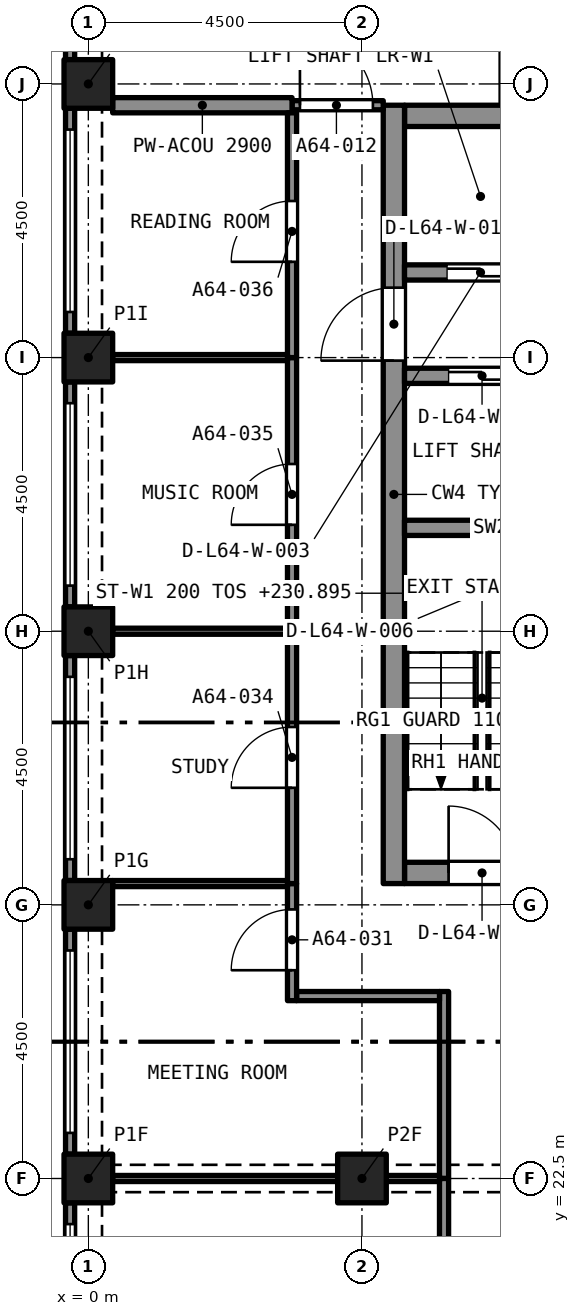
"""IFC4 building model, lengths in metres.
Left out: names, types, materials, properties, quantities, classifications, styles, units other than length and angle.
Written with IfcOpenShell. Run it as: python <this file> out.ifc"""

import sys

from ifc_helpers import new_model, si_unit, direction, frame, frame_2d, origin, origin_2d, place, context, subcontext, project, spatial, rectangle, extrude, element, fill, save


model = new_model("IFC4")
c1 = context("Model", 3, precision=1e-05, world=origin(), true_north=direction((0.0, 1.0)))
c2 = subcontext(c1, "Body", "Model", "MODEL_VIEW")
j1 = project(units=[si_unit("LENGTHUNIT", "METRE"), si_unit("PLANEANGLEUNIT", "RADIAN")], contexts=[c1])
p1 = place(None, origin())
s1 = spatial("IfcSite", under=j1, at=p1, CompositionType="ELEMENT")
p2 = place(p1, origin())
s2 = spatial("IfcBuilding", under=s1, at=p2, CompositionType="ELEMENT")
p3 = place(p2, frame((0.0, 0.0, 229.295)))
s3 = spatial("IfcBuildingStorey", under=s2, at=p3, CompositionType="ELEMENT", Elevation=229.295)
for number, where, z_axis, x_axis in (
    (1, (0.0, 22.5, 0.0), (0.0, 0.0, 1.0), (1.0, 0.0, 0.0)),
    (2, (4.5, 22.5, 0.0), (0.0, 0.0, 1.0), (1.0, 0.0, 0.0)),
    (3, (0.0, 27.0, 0.0), (0.0, 0.0, 1.0), (1.0, 0.0, 0.0)),
    (4, (0.0, 31.5, 0.0), (0.0, 0.0, 1.0), (1.0, 0.0, 0.0)),
    (5, (0.0, 36.0, 0.0), (0.0, 0.0, 1.0), (1.0, 0.0, 0.0)),
    (6, (0.0, 40.5, 0.0), (0.0, 0.0, 1.0), (1.0, 0.0, 0.0)),
):
    element("IfcColumn", number, at=place(p3, frame(where, z_axis=z_axis, x_axis=x_axis)), inside=s3, PredefinedType="COLUMN", context=c2, shape_type="SweptSolid", body=[
        extrude(rectangle(XDim=0.8, YDim=0.8, at=origin_2d()), origin(), (0.0, 0.0, 1.0), 3.2),
    ])
p4 = place(p3, frame((5.2, 27.525, 0.0), z_axis=(0.0, 0.0, 1.0), x_axis=(1.0, 0.0, 0.0)))
e7 = element("IfcWall", 7, at=p4, inside=s3, PredefinedType="SOLIDWALL", context=c2, shape_type="SweptSolid", body=[
    extrude(rectangle(XDim=7.6, YDim=0.35, at=frame_2d((3.8, 0.0))), origin(), (0.0, 0.0, 1.0), 3.2),
])
p5 = place(p4, frame((0.725, 0.0, 0.0)))
e8 = element("IfcOpeningElement", 8, at=p5, cuts=e7, PredefinedType="OPENING", context=c2, shape_type="SweptSolid", body=[
    extrude(rectangle(XDim=1.1, YDim=2.1, at=frame_2d((0.55, 1.05))), frame((0.0, 0.185, 0.0), z_axis=(0.0, -1.0, 0.0), x_axis=(1.0, 0.0, 0.0)), (0.0, 0.0, 1.0), 0.37),
])
p6 = place(p4, frame((3.25, 0.0, 0.0)))
e9 = element("IfcOpeningElement", 9, at=p6, cuts=e7, PredefinedType="OPENING", context=c2, shape_type="SweptSolid", body=[
    extrude(rectangle(XDim=1.1, YDim=2.1, at=frame_2d((0.55, 1.05))), frame((0.0, 0.185, 0.0), z_axis=(0.0, -1.0, 0.0), x_axis=(1.0, 0.0, 0.0)), (0.0, 0.0, 1.0), 0.37),
])
p7 = place(p4, frame((5.775, 0.0, 0.0)))
e10 = element("IfcOpeningElement", 10, at=p7, cuts=e7, PredefinedType="OPENING", context=c2, shape_type="SweptSolid", body=[
    extrude(rectangle(XDim=1.1, YDim=2.1, at=frame_2d((0.55, 1.05))), frame((0.0, 0.185, 0.0), z_axis=(0.0, -1.0, 0.0), x_axis=(1.0, 0.0, 0.0)), (0.0, 0.0, 1.0), 0.37),
])
p8 = place(p3, frame((5.2, 39.975, 0.0), z_axis=(0.0, 0.0, 1.0), x_axis=(1.0, 0.0, 0.0)))
e11 = element("IfcWall", 11, at=p8, inside=s3, PredefinedType="SOLIDWALL", context=c2, shape_type="SweptSolid", body=[
    extrude(rectangle(XDim=7.6, YDim=0.35, at=frame_2d((3.8, 0.0))), origin(), (0.0, 0.0, 1.0), 3.2),
])
p9 = place(p3, frame((5.025, 27.35, 0.0), z_axis=(0.0, 0.0, 1.0), x_axis=(0.0, 1.0, 0.0)))
e12 = element("IfcWall", 12, at=p9, inside=s3, PredefinedType="SOLIDWALL", context=c2, shape_type="SweptSolid", body=[
    extrude(rectangle(XDim=12.8, YDim=0.35, at=frame_2d((6.4, 0.0))), origin(), (0.0, 0.0, 1.0), 3.2),
])
p10 = place(p9, frame((8.6, 0.0, 0.0)))
e13 = element("IfcOpeningElement", 13, at=p10, cuts=e12, PredefinedType="OPENING", context=c2, shape_type="SweptSolid", body=[
    extrude(rectangle(XDim=1.2, YDim=2.1, at=frame_2d((0.6, 1.05))), frame((0.0, 0.185, 0.0), z_axis=(0.0, -1.0, 0.0), x_axis=(1.0, 0.0, 0.0)), (0.0, 0.0, 1.0), 0.37),
])
p11 = place(p3, frame((-0.3, 40.9, 0.0), z_axis=(0.0, 0.0, 1.0), x_axis=(0.0, 1.0, 0.0)))
e14 = element("IfcWall", 14, at=p11, inside=s3, PredefinedType="SOLIDWALL", context=c2, shape_type="SweptSolid", body=[
    extrude(rectangle(XDim=3.7, YDim=0.15, at=frame_2d((1.85, 0.0))), origin(), (0.0, 0.0, 1.0), 3.2),
])
p12 = place(p11, frame((0.35, 0.0, 0.45)))
e15 = element("IfcOpeningElement", 15, at=p12, cuts=e14, PredefinedType="OPENING", context=c2, shape_type="SweptSolid", body=[
    extrude(rectangle(XDim=3.0, YDim=1.95, at=frame_2d((1.5, 0.975))), frame((0.0, 0.085, 0.0), z_axis=(0.0, -1.0, 0.0), x_axis=(1.0, 0.0, 0.0)), (0.0, 0.0, 1.0), 0.17),
])
p13 = place(p3, frame((-0.3, 36.4, 0.0), z_axis=(0.0, 0.0, 1.0), x_axis=(0.0, 1.0, 0.0)))
e16 = element("IfcWall", 16, at=p13, inside=s3, PredefinedType="SOLIDWALL", context=c2, shape_type="SweptSolid", body=[
    extrude(rectangle(XDim=3.7, YDim=0.15, at=frame_2d((1.85, 0.0))), origin(), (0.0, 0.0, 1.0), 3.2),
])
p14 = place(p13, frame((0.35, 0.0, 0.45)))
e17 = element("IfcOpeningElement", 17, at=p14, cuts=e16, PredefinedType="OPENING", context=c2, shape_type="SweptSolid", body=[
    extrude(rectangle(XDim=3.0, YDim=1.95, at=frame_2d((1.5, 0.975))), frame((0.0, 0.085, 0.0), z_axis=(0.0, -1.0, 0.0), x_axis=(1.0, 0.0, 0.0)), (0.0, 0.0, 1.0), 0.17),
])
p15 = place(p3, frame((-0.3, 31.9, 0.0), z_axis=(0.0, 0.0, 1.0), x_axis=(0.0, 1.0, 0.0)))
e18 = element("IfcWall", 18, at=p15, inside=s3, PredefinedType="SOLIDWALL", context=c2, shape_type="SweptSolid", body=[
    extrude(rectangle(XDim=3.7, YDim=0.15, at=frame_2d((1.85, 0.0))), origin(), (0.0, 0.0, 1.0), 3.2),
])
p16 = place(p15, frame((0.35, 0.0, 0.45)))
e19 = element("IfcOpeningElement", 19, at=p16, cuts=e18, PredefinedType="OPENING", context=c2, shape_type="SweptSolid", body=[
    extrude(rectangle(XDim=3.0, YDim=1.95, at=frame_2d((1.5, 0.975))), frame((0.0, 0.085, 0.0), z_axis=(0.0, -1.0, 0.0), x_axis=(1.0, 0.0, 0.0)), (0.0, 0.0, 1.0), 0.17),
])
p17 = place(p3, frame((-0.3, 27.4, 0.0), z_axis=(0.0, 0.0, 1.0), x_axis=(0.0, 1.0, 0.0)))
e20 = element("IfcWall", 20, at=p17, inside=s3, PredefinedType="SOLIDWALL", context=c2, shape_type="SweptSolid", body=[
    extrude(rectangle(XDim=3.7, YDim=0.15, at=frame_2d((1.85, 0.0))), origin(), (0.0, 0.0, 1.0), 3.2),
])
p18 = place(p17, frame((0.35, 0.0, 0.45)))
e21 = element("IfcOpeningElement", 21, at=p18, cuts=e20, PredefinedType="OPENING", context=c2, shape_type="SweptSolid", body=[
    extrude(rectangle(XDim=3.0, YDim=1.95, at=frame_2d((1.5, 0.975))), frame((0.0, 0.085, 0.0), z_axis=(0.0, -1.0, 0.0), x_axis=(1.0, 0.0, 0.0)), (0.0, 0.0, 1.0), 0.17),
])
p19 = place(p3, frame((-0.3, 22.9, 0.0), z_axis=(0.0, 0.0, 1.0), x_axis=(0.0, 1.0, 0.0)))
e22 = element("IfcWall", 22, at=p19, inside=s3, PredefinedType="SOLIDWALL", context=c2, shape_type="SweptSolid", body=[
    extrude(rectangle(XDim=3.7, YDim=0.15, at=frame_2d((1.85, 0.0))), origin(), (0.0, 0.0, 1.0), 3.2),
])
p20 = place(p19, frame((0.35, 0.0, 0.45)))
e23 = element("IfcOpeningElement", 23, at=p20, cuts=e22, PredefinedType="OPENING", context=c2, shape_type="SweptSolid", body=[
    extrude(rectangle(XDim=3.0, YDim=1.95, at=frame_2d((1.5, 0.975))), frame((0.0, 0.085, 0.0), z_axis=(0.0, -1.0, 0.0), x_axis=(1.0, 0.0, 0.0)), (0.0, 0.0, 1.0), 0.17),
])
p21 = place(p3, frame((-0.3, 18.4, 0.0), z_axis=(0.0, 0.0, 1.0), x_axis=(0.0, 1.0, 0.0)))
e24 = element("IfcWall", 24, at=p21, inside=s3, PredefinedType="SOLIDWALL", context=c2, shape_type="SweptSolid", body=[
    extrude(rectangle(XDim=3.7, YDim=0.15, at=frame_2d((1.85, 0.0))), origin(), (0.0, 0.0, 1.0), 3.2),
])
p22 = place(p21, frame((0.35, 0.0, 0.45)))
e25 = element("IfcOpeningElement", 25, at=p22, cuts=e24, PredefinedType="OPENING", context=c2, shape_type="SweptSolid", body=[
    extrude(rectangle(XDim=3.0, YDim=1.95, at=frame_2d((1.5, 0.975))), frame((0.0, 0.085, 0.0), z_axis=(0.0, -1.0, 0.0), x_axis=(1.0, 0.0, 0.0)), (0.0, 0.0, 1.0), 0.17),
])
p23 = place(p3, frame((3.35, 40.15, 0.0), z_axis=(0.0, 0.0, 1.0), x_axis=(1.0, 0.0, 0.0)))
e26 = element("IfcWall", 26, at=p23, inside=s3, PredefinedType="PARTITIONING", context=c2, shape_type="SweptSolid", body=[
    extrude(rectangle(XDim=1.5, YDim=0.15, at=frame_2d((0.75, 0.0))), origin(), (0.0, 0.0, 1.0), 2.9),
])
p24 = place(p23, frame((0.13, 0.0, 0.0)))
e27 = element("IfcOpeningElement", 27, at=p24, cuts=e26, PredefinedType="OPENING", context=c2, shape_type="SweptSolid", body=[
    extrude(rectangle(XDim=1.2, YDim=2.4, at=frame_2d((0.6, 1.2))), frame((0.0, 0.085, 0.0), z_axis=(0.0, -1.0, 0.0), x_axis=(1.0, 0.0, 0.0)), (0.0, 0.0, 1.0), 0.17),
])
p25 = place(p3, frame((0.4, 40.15, 0.0), z_axis=(0.0, 0.0, 1.0), x_axis=(1.0, 0.0, 0.0)))
e28 = element("IfcWall", 28, at=p25, inside=s3, PredefinedType="PARTITIONING", context=c2, shape_type="SweptSolid", body=[
    extrude(rectangle(XDim=2.95, YDim=0.25, at=frame_2d((1.475, 0.0))), origin(), (0.0, 0.0, 1.0), 2.9),
])
p26 = place(p3, frame((5.85, 22.5, 0.0), z_axis=(0.0, 0.0, 1.0), x_axis=(0.0, 1.0, 0.0)))
e29 = element("IfcWall", 29, at=p26, inside=s3, PredefinedType="PARTITIONING", context=c2, shape_type="SweptSolid", body=[
    extrude(rectangle(XDim=3.075, YDim=0.15, at=frame_2d((1.538, 0.0))), origin(), (0.0, 0.0, 1.0), 2.9),
])
p27 = place(p3, frame((3.425, 25.5, 0.0), z_axis=(0.0, 0.0, 1.0), x_axis=(1.0, 0.0, 0.0)))
e30 = element("IfcWall", 30, at=p27, inside=s3, PredefinedType="PARTITIONING", context=c2, shape_type="SweptSolid", body=[
    extrude(rectangle(XDim=2.35, YDim=0.15, at=frame_2d((1.175, 0.0))), origin(), (0.0, 0.0, 1.0), 2.9),
])
p28 = place(p3, frame((3.35, 25.425, 0.0), z_axis=(0.0, 0.0, 1.0), x_axis=(0.0, 1.0, 0.0)))
e31 = element("IfcWall", 31, at=p28, inside=s3, PredefinedType="PARTITIONING", context=c2, shape_type="SweptSolid", body=[
    extrude(rectangle(XDim=1.925, YDim=0.15, at=frame_2d((0.962, 0.0))), origin(), (0.0, 0.0, 1.0), 2.9),
])
p29 = place(p28, frame((0.5, 0.0, 0.0)))
e32 = element("IfcOpeningElement", 32, at=p29, cuts=e31, PredefinedType="OPENING", context=c2, shape_type="SweptSolid", body=[
    extrude(rectangle(XDim=1.0, YDim=2.1, at=frame_2d((0.5, 1.05))), frame((0.0, 0.085, 0.0), z_axis=(0.0, -1.0, 0.0), x_axis=(1.0, 0.0, 0.0)), (0.0, 0.0, 1.0), 0.17),
])
p30 = place(p3, frame((3.35, 27.35, 0.0), z_axis=(0.0, 0.0, 1.0), x_axis=(0.0, 1.0, 0.0)))
e33 = element("IfcWall", 33, at=p30, inside=s3, PredefinedType="PARTITIONING", context=c2, shape_type="SweptSolid", body=[
    extrude(rectangle(XDim=4.15, YDim=0.15, at=frame_2d((2.075, 0.0))), origin(), (0.0, 0.0, 1.0), 2.9),
])
p31 = place(p30, frame((1.575, 0.0, 0.0)))
e34 = element("IfcOpeningElement", 34, at=p31, cuts=e33, PredefinedType="OPENING", context=c2, shape_type="SweptSolid", body=[
    extrude(rectangle(XDim=1.0, YDim=2.1, at=frame_2d((0.5, 1.05))), frame((0.0, 0.085, 0.0), z_axis=(0.0, -1.0, 0.0), x_axis=(1.0, 0.0, 0.0)), (0.0, 0.0, 1.0), 0.17),
])
p32 = place(p3, frame((3.35, 31.5, 0.0), z_axis=(0.0, 0.0, 1.0), x_axis=(0.0, 1.0, 0.0)))
e35 = element("IfcWall", 35, at=p32, inside=s3, PredefinedType="PARTITIONING", context=c2, shape_type="SweptSolid", body=[
    extrude(rectangle(XDim=4.5, YDim=0.15, at=frame_2d((2.25, 0.0))), origin(), (0.0, 0.0, 1.0), 2.9),
])
p33 = place(p32, frame((1.75, 0.0, 0.0)))
e36 = element("IfcOpeningElement", 36, at=p33, cuts=e35, PredefinedType="OPENING", context=c2, shape_type="SweptSolid", body=[
    extrude(rectangle(XDim=1.0, YDim=2.1, at=frame_2d((0.5, 1.05))), frame((0.0, 0.085, 0.0), z_axis=(0.0, -1.0, 0.0), x_axis=(1.0, 0.0, 0.0)), (0.0, 0.0, 1.0), 0.17),
])
p34 = place(p3, frame((3.35, 36.0, 0.0), z_axis=(0.0, 0.0, 1.0), x_axis=(0.0, 1.0, 0.0)))
e37 = element("IfcWall", 37, at=p34, inside=s3, PredefinedType="PARTITIONING", context=c2, shape_type="SweptSolid", body=[
    extrude(rectangle(XDim=4.025, YDim=0.15, at=frame_2d((2.012, 0.0))), origin(), (0.0, 0.0, 1.0), 2.9),
])
p35 = place(p34, frame((1.575, 0.0, 0.0)))
e38 = element("IfcOpeningElement", 38, at=p35, cuts=e37, PredefinedType="OPENING", context=c2, shape_type="SweptSolid", body=[
    extrude(rectangle(XDim=1.0, YDim=2.1, at=frame_2d((0.5, 1.05))), frame((0.0, 0.085, 0.0), z_axis=(0.0, -1.0, 0.0), x_axis=(1.0, 0.0, 0.0)), (0.0, 0.0, 1.0), 0.17),
])
p36 = place(p3, frame((5.85, 13.025, 0.0), z_axis=(0.0, 0.0, 1.0), x_axis=(0.0, 1.0, 0.0)))
e39 = element("IfcWall", 39, at=p36, inside=s3, PredefinedType="PARTITIONING", context=c2, shape_type="SweptSolid", body=[
    extrude(rectangle(XDim=9.475, YDim=0.15, at=frame_2d((4.738, 0.0))), origin(), (0.0, 0.0, 1.0), 2.9),
])
p37 = place(p36, frame((4.275, 0.0, 0.0)))
e40 = element("IfcOpeningElement", 40, at=p37, cuts=e39, PredefinedType="OPENING", context=c2, shape_type="SweptSolid", body=[
    extrude(rectangle(XDim=1.0, YDim=2.1, at=frame_2d((0.5, 1.05))), frame((0.0, 0.085, 0.0), z_axis=(0.0, -1.0, 0.0), x_axis=(1.0, 0.0, 0.0)), (0.0, 0.0, 1.0), 0.17),
])
p38 = place(p3, frame((0.4, 27.35, 0.0), z_axis=(0.0, 0.0, 1.0), x_axis=(1.0, 0.0, 0.0)))
e41 = element("IfcWall", 41, at=p38, inside=s3, PredefinedType="PARTITIONING", context=c2, shape_type="SweptSolid", body=[
    extrude(rectangle(XDim=2.875, YDim=0.1, at=frame_2d((1.438, 0.0))), origin(), (0.0, 0.0, 1.0), 2.9),
])
p39 = place(p3, frame((4.9, 22.5, 0.0), z_axis=(0.0, 0.0, 1.0), x_axis=(1.0, 0.0, 0.0)))
e42 = element("IfcWall", 42, at=p39, inside=s3, PredefinedType="PARTITIONING", context=c2, shape_type="SweptSolid", body=[
    extrude(rectangle(XDim=0.875, YDim=0.1, at=frame_2d((0.438, 0.0))), origin(), (0.0, 0.0, 1.0), 2.38),
])
p40 = place(p3, frame((0.4, 22.5, 0.0), z_axis=(0.0, 0.0, 1.0), x_axis=(1.0, 0.0, 0.0)))
e43 = element("IfcWall", 43, at=p40, inside=s3, PredefinedType="PARTITIONING", context=c2, shape_type="SweptSolid", body=[
    extrude(rectangle(XDim=3.7, YDim=0.1, at=frame_2d((1.85, 0.0))), origin(), (0.0, 0.0, 1.0), 2.38),
])
for number, where, z_axis, x_axis in (
    (44, (0.4, 31.5, 0.0), (0.0, 0.0, 1.0), (1.0, 0.0, 0.0)),
    (45, (0.4, 36.0, 0.0), (0.0, 0.0, 1.0), (1.0, 0.0, 0.0)),
):
    element("IfcWall", number, at=place(p3, frame(where, z_axis=z_axis, x_axis=x_axis)), inside=s3, PredefinedType="PARTITIONING", context=c2, shape_type="SweptSolid", body=[
        extrude(rectangle(XDim=2.875, YDim=0.1, at=frame_2d((1.438, 0.0))), origin(), (0.0, 0.0, 1.0), 2.9),
    ])
p41 = place(p3, frame((5.2, 33.2, 0.0), z_axis=(0.0, 0.0, 1.0), x_axis=(1.0, 0.0, 0.0)))
e46 = element("IfcWall", 46, at=p41, inside=s3, PredefinedType="SOLIDWALL", context=c2, shape_type="SweptSolid", body=[
    extrude(rectangle(XDim=7.6, YDim=0.25, at=frame_2d((3.8, 0.0))), origin(), (0.0, 0.0, 1.0), 2.9),
])
p42 = place(p41, frame((3.3, 0.0, 0.0)))
e47 = element("IfcOpeningElement", 47, at=p42, cuts=e46, PredefinedType="OPENING", context=c2, shape_type="SweptSolid", body=[
    extrude(rectangle(XDim=1.0, YDim=2.1, at=frame_2d((0.5, 1.05))), frame((0.0, 0.135, 0.0), z_axis=(0.0, -1.0, 0.0), x_axis=(1.0, 0.0, 0.0)), (0.0, 0.0, 1.0), 0.27),
])
p43 = place(p3, frame((5.2, 35.7, 0.0), z_axis=(0.0, 0.0, 1.0), x_axis=(1.0, 0.0, 0.0)))
e48 = element("IfcWall", 48, at=p43, inside=s3, PredefinedType="SOLIDWALL", context=c2, shape_type="SweptSolid", body=[
    extrude(rectangle(XDim=7.6, YDim=0.25, at=frame_2d((3.8, 0.0))), origin(), (0.0, 0.0, 1.0), 2.9),
])
p44 = place(p43, frame((0.725, 0.0, 0.0)))
e49 = element("IfcOpeningElement", 49, at=p44, cuts=e48, PredefinedType="OPENING", context=c2, shape_type="SweptSolid", body=[
    extrude(rectangle(XDim=1.1, YDim=2.4, at=frame_2d((0.55, 1.2))), frame((0.0, 0.135, 0.0), z_axis=(0.0, -1.0, 0.0), x_axis=(1.0, 0.0, 0.0)), (0.0, 0.0, 1.0), 0.27),
])
p45 = place(p43, frame((5.875, 0.0, 0.0)))
e50 = element("IfcOpeningElement", 50, at=p45, cuts=e48, PredefinedType="OPENING", context=c2, shape_type="SweptSolid", body=[
    extrude(rectangle(XDim=0.9, YDim=2.1, at=frame_2d((0.45, 1.05))), frame((0.0, 0.135, 0.0), z_axis=(0.0, -1.0, 0.0), x_axis=(1.0, 0.0, 0.0)), (0.0, 0.0, 1.0), 0.27),
])
p46 = place(p3, frame((5.2, 37.4, 0.0), z_axis=(0.0, 0.0, 1.0), x_axis=(1.0, 0.0, 0.0)))
e51 = element("IfcWall", 51, at=p46, inside=s3, PredefinedType="SOLIDWALL", context=c2, shape_type="SweptSolid", body=[
    extrude(rectangle(XDim=7.6, YDim=0.25, at=frame_2d((3.8, 0.0))), origin(), (0.0, 0.0, 1.0), 2.9),
])
p47 = place(p46, frame((0.7, 0.0, 0.0)))
e52 = element("IfcOpeningElement", 52, at=p47, cuts=e51, PredefinedType="OPENING", context=c2, shape_type="SweptSolid", body=[
    extrude(rectangle(XDim=1.1, YDim=2.4, at=frame_2d((0.55, 1.2))), frame((0.0, 0.135, 0.0), z_axis=(0.0, -1.0, 0.0), x_axis=(1.0, 0.0, 0.0)), (0.0, 0.0, 1.0), 0.27),
])
p48 = place(p14, origin())
e53 = element("IfcWindow", 53, at=p48, inside=s3, PartitioningType="SINGLE_PANEL", PredefinedType="WINDOW", context=c2, shape_type="SweptSolid", body=[
    extrude(rectangle(XDim=3.0, YDim=1.95, at=frame_2d((1.5, 0.975))), frame((0.0, 0.03, 0.0), z_axis=(0.0, -1.0, 0.0), x_axis=(1.0, 0.0, 0.0)), (0.0, 0.0, 1.0), 0.06),
])
fill(e17, e53)
p49 = place(p16, origin())
e54 = element("IfcWindow", 54, at=p49, inside=s3, PartitioningType="SINGLE_PANEL", PredefinedType="WINDOW", context=c2, shape_type="SweptSolid", body=[
    extrude(rectangle(XDim=3.0, YDim=1.95, at=frame_2d((1.5, 0.975))), frame((0.0, 0.03, 0.0), z_axis=(0.0, -1.0, 0.0), x_axis=(1.0, 0.0, 0.0)), (0.0, 0.0, 1.0), 0.06),
])
fill(e19, e54)
p50 = place(p18, origin())
e55 = element("IfcWindow", 55, at=p50, inside=s3, PartitioningType="SINGLE_PANEL", PredefinedType="WINDOW", context=c2, shape_type="SweptSolid", body=[
    extrude(rectangle(XDim=3.0, YDim=1.95, at=frame_2d((1.5, 0.975))), frame((0.0, 0.03, 0.0), z_axis=(0.0, -1.0, 0.0), x_axis=(1.0, 0.0, 0.0)), (0.0, 0.0, 1.0), 0.06),
])
fill(e21, e55)
p51 = place(p20, origin())
e56 = element("IfcWindow", 56, at=p51, inside=s3, PartitioningType="SINGLE_PANEL", PredefinedType="WINDOW", context=c2, shape_type="SweptSolid", body=[
    extrude(rectangle(XDim=3.0, YDim=1.95, at=frame_2d((1.5, 0.975))), frame((0.0, 0.03, 0.0), z_axis=(0.0, -1.0, 0.0), x_axis=(1.0, 0.0, 0.0)), (0.0, 0.0, 1.0), 0.06),
])
fill(e23, e56)
p52 = place(p22, origin())
e57 = element("IfcWindow", 57, at=p52, inside=s3, PartitioningType="SINGLE_PANEL", PredefinedType="WINDOW", context=c2, shape_type="SweptSolid", body=[
    extrude(rectangle(XDim=3.0, YDim=1.95, at=frame_2d((1.5, 0.975))), frame((0.0, 0.03, 0.0), z_axis=(0.0, -1.0, 0.0), x_axis=(1.0, 0.0, 0.0)), (0.0, 0.0, 1.0), 0.06),
])
fill(e25, e57)
p53 = place(p24, origin())
e58 = element("IfcDoor", 58, at=p53, inside=s3, OperationType="SINGLE_SWING_LEFT", PredefinedType="DOOR", context=c2, shape_type="SweptSolid", body=[
    extrude(rectangle(XDim=1.2, YDim=2.4, at=frame_2d((0.6, 1.2))), frame((0.0, 0.025, 0.0), z_axis=(0.0, -1.0, 0.0), x_axis=(1.0, 0.0, 0.0)), (0.0, 0.0, 1.0), 0.05),
])
fill(e27, e58)
p54 = place(p29, origin())
e59 = element("IfcDoor", 59, at=p54, inside=s3, OperationType="SINGLE_SWING_RIGHT", PredefinedType="DOOR", context=c2, shape_type="SweptSolid", body=[
    extrude(rectangle(XDim=1.0, YDim=2.1, at=frame_2d((0.5, 1.05))), frame((0.0, 0.025, 0.0), z_axis=(0.0, -1.0, 0.0), x_axis=(1.0, 0.0, 0.0)), (0.0, 0.0, 1.0), 0.05),
])
fill(e32, e59)
p55 = place(p31, origin())
e60 = element("IfcDoor", 60, at=p55, inside=s3, OperationType="SINGLE_SWING_RIGHT", PredefinedType="DOOR", context=c2, shape_type="SweptSolid", body=[
    extrude(rectangle(XDim=1.0, YDim=2.1, at=frame_2d((0.5, 1.05))), frame((0.0, 0.025, 0.0), z_axis=(0.0, -1.0, 0.0), x_axis=(1.0, 0.0, 0.0)), (0.0, 0.0, 1.0), 0.05),
])
fill(e34, e60)
p56 = place(p33, origin())
e61 = element("IfcDoor", 61, at=p56, inside=s3, OperationType="SINGLE_SWING_RIGHT", PredefinedType="DOOR", context=c2, shape_type="SweptSolid", body=[
    extrude(rectangle(XDim=1.0, YDim=2.1, at=frame_2d((0.5, 1.05))), frame((0.0, 0.025, 0.0), z_axis=(0.0, -1.0, 0.0), x_axis=(1.0, 0.0, 0.0)), (0.0, 0.0, 1.0), 0.05),
])
fill(e36, e61)
p57 = place(p35, origin())
e62 = element("IfcDoor", 62, at=p57, inside=s3, OperationType="SINGLE_SWING_RIGHT", PredefinedType="DOOR", context=c2, shape_type="SweptSolid", body=[
    extrude(rectangle(XDim=1.0, YDim=2.1, at=frame_2d((0.5, 1.05))), frame((0.0, 0.025, 0.0), z_axis=(0.0, -1.0, 0.0), x_axis=(1.0, 0.0, 0.0)), (0.0, 0.0, 1.0), 0.05),
])
fill(e38, e62)
p58 = place(p47, origin())
e63 = element("IfcDoor", 63, at=p58, inside=s3, OperationType="SLIDING_TO_LEFT", PredefinedType="DOOR", context=c2, shape_type="SweptSolid", body=[
    extrude(rectangle(XDim=1.1, YDim=2.4, at=frame_2d((0.55, 1.2))), frame((0.0, 0.025, 0.0), z_axis=(0.0, -1.0, 0.0), x_axis=(1.0, 0.0, 0.0)), (0.0, 0.0, 1.0), 0.05),
])
fill(e52, e63)
p59 = place(p44, origin())
e64 = element("IfcDoor", 64, at=p59, inside=s3, OperationType="SLIDING_TO_LEFT", PredefinedType="DOOR", context=c2, shape_type="SweptSolid", body=[
    extrude(rectangle(XDim=1.1, YDim=2.4, at=frame_2d((0.55, 1.2))), frame((0.0, 0.025, 0.0), z_axis=(0.0, -1.0, 0.0), x_axis=(1.0, 0.0, 0.0)), (0.0, 0.0, 1.0), 0.05),
])
fill(e49, e64)
p60 = place(p5, origin())
e65 = element("IfcDoor", 65, at=p60, inside=s3, OperationType="SINGLE_SWING_LEFT", PredefinedType="DOOR", context=c2, shape_type="SweptSolid", body=[
    extrude(rectangle(XDim=1.1, YDim=2.1, at=frame_2d((0.55, 1.05))), frame((0.0, 0.025, 0.0), z_axis=(0.0, -1.0, 0.0), x_axis=(1.0, 0.0, 0.0)), (0.0, 0.0, 1.0), 0.05),
])
fill(e8, e65)
p61 = place(p10, origin())
e66 = element("IfcDoor", 66, at=p61, inside=s3, OperationType="SINGLE_SWING_LEFT", PredefinedType="DOOR", context=c2, shape_type="SweptSolid", body=[
    extrude(rectangle(XDim=1.2, YDim=2.1, at=frame_2d((0.6, 1.05))), frame((0.0, 0.025, 0.0), z_axis=(0.0, -1.0, 0.0), x_axis=(1.0, 0.0, 0.0)), (0.0, 0.0, 1.0), 0.05),
])
fill(e13, e66)
save(model, sys.argv[1])
